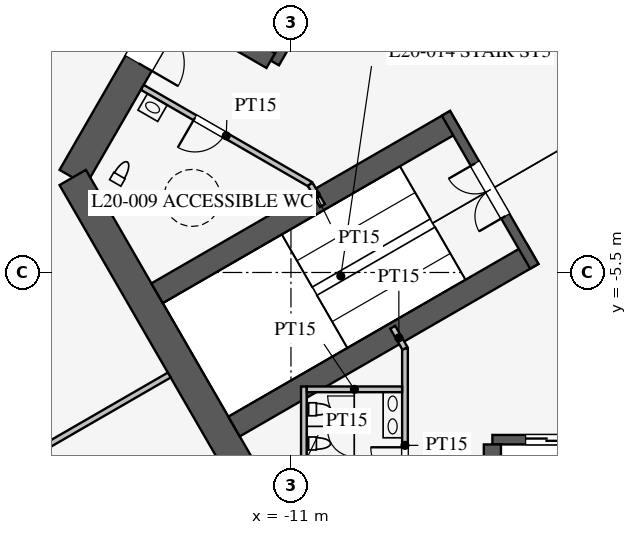
"""IFC4 building model, lengths in metres.
Left out: names, types, materials, properties, quantities, classifications, styles, units other than length and angle.
Written with IfcOpenShell. Run it as: python <this file> out.ifc"""

import sys

from ifc_helpers import new_model, si_unit, direction, frame, frame_2d, origin, place, context, subcontext, project, spatial, rectangle, extrude, element, fill, save


model = new_model("IFC4")
c1 = context("Model", 3, precision=1e-05, world=origin(), true_north=direction((0.0, 1.0)))
c2 = subcontext(c1, "Body", "Model", "MODEL_VIEW")
j1 = project(units=[si_unit("LENGTHUNIT", "METRE"), si_unit("PLANEANGLEUNIT", "RADIAN")], contexts=[c1])
p1 = place(None, origin())
s1 = spatial("IfcSite", under=j1, at=p1, CompositionType="ELEMENT")
p2 = place(p1, origin())
s2 = spatial("IfcBuilding", under=s1, at=p2, CompositionType="ELEMENT")
p3 = place(p2, frame((0.0, 0.0, 87.9)))
s3 = spatial("IfcBuildingStorey", under=s2, at=p3, CompositionType="ELEMENT", Elevation=87.9)
p4 = place(p3, frame((-5.773, 16.0, 0.0), z_axis=(0.0, 0.0, 1.0), x_axis=(-0.500002442456, -0.866023993627, 0.0)))
e1 = element("IfcWall", 1, at=p4, inside=s3, PredefinedType="SHEAR", context=c2, shape_type="SweptSolid", body=[
    extrude(rectangle(XDim=21.939, YDim=0.8, at=frame_2d((10.97, 0.0))), origin(), (0.0, 0.0, 1.0), 4.2),
])
p5 = place(p4, frame((17.27, 0.0, 0.0)))
e2 = element("IfcOpeningElement", 2, at=p5, cuts=e1, PredefinedType="OPENING", context=c2, shape_type="SweptSolid", body=[
    extrude(rectangle(XDim=1.2, YDim=2.1, at=frame_2d((0.6, 1.05))), frame((0.0, 0.41, 0.0), z_axis=(0.0, -1.0, 0.0), x_axis=(1.0, 0.0, 0.0)), (0.0, 0.0, 1.0), 0.82),
])
p6 = place(p4, frame((3.47, 0.0, 0.0)))
e3 = element("IfcOpeningElement", 3, at=p6, cuts=e1, PredefinedType="OPENING", context=c2, shape_type="SweptSolid", body=[
    extrude(rectangle(XDim=1.2, YDim=2.1, at=frame_2d((0.6, 1.05))), frame((0.0, 0.41, 0.0), z_axis=(0.0, -1.0, 0.0), x_axis=(1.0, 0.0, 0.0)), (0.0, 0.0, 1.0), 0.82),
])
p7 = place(p3, frame((-16.743, -3.0, 0.0), z_axis=(0.0, 0.0, 1.0), x_axis=(0.499995765644, -0.866027848477, 0.0)))
e4 = element("IfcWall", 4, at=p7, inside=s3, PredefinedType="SHEAR", context=c2, shape_type="SweptSolid", body=[
    extrude(rectangle(XDim=11.547, YDim=0.8, at=frame_2d((5.773, 0.0))), origin(), (0.0, 0.0, 1.0), 4.2),
])
p8 = place(p3, frame((-5.7, -9.9, 0.0), z_axis=(0.0, 0.0, 1.0), x_axis=(1.0, 0.0, 0.0)))
e5 = element("IfcWall", 5, at=p8, inside=s3, PredefinedType="SHEAR", context=c2, shape_type="SweptSolid", body=[
    extrude(rectangle(XDim=11.4, YDim=0.25, at=frame_2d((5.7, 0.0))), origin(), (0.0, 0.0, 1.0), 4.2),
])
p9 = place(p8, frame((0.875, 0.0, 0.0)))
e6 = element("IfcOpeningElement", 6, at=p9, cuts=e5, PredefinedType="OPENING", context=c2, shape_type="SweptSolid", body=[
    extrude(rectangle(XDim=1.1, YDim=2.2, at=frame_2d((0.55, 1.1))), frame((0.0, 0.135, 0.0), z_axis=(0.0, -1.0, 0.0), x_axis=(1.0, 0.0, 0.0)), (0.0, 0.0, 1.0), 0.27),
])
p10 = place(p8, frame((3.725, 0.0, 0.0)))
e7 = element("IfcOpeningElement", 7, at=p10, cuts=e5, PredefinedType="OPENING", context=c2, shape_type="SweptSolid", body=[
    extrude(rectangle(XDim=1.1, YDim=2.2, at=frame_2d((0.55, 1.1))), frame((0.0, 0.135, 0.0), z_axis=(0.0, -1.0, 0.0), x_axis=(1.0, 0.0, 0.0)), (0.0, 0.0, 1.0), 0.27),
])
p11 = place(p8, frame((6.575, 0.0, 0.0)))
e8 = element("IfcOpeningElement", 8, at=p11, cuts=e5, PredefinedType="OPENING", context=c2, shape_type="SweptSolid", body=[
    extrude(rectangle(XDim=1.1, YDim=2.2, at=frame_2d((0.55, 1.1))), frame((0.0, 0.135, 0.0), z_axis=(0.0, -1.0, 0.0), x_axis=(1.0, 0.0, 0.0)), (0.0, 0.0, 1.0), 0.27),
])
p12 = place(p8, frame((9.425, 0.0, 0.0)))
e9 = element("IfcOpeningElement", 9, at=p12, cuts=e5, PredefinedType="OPENING", context=c2, shape_type="SweptSolid", body=[
    extrude(rectangle(XDim=1.1, YDim=2.2, at=frame_2d((0.55, 1.1))), frame((0.0, 0.135, 0.0), z_axis=(0.0, -1.0, 0.0), x_axis=(1.0, 0.0, 0.0)), (0.0, 0.0, 1.0), 0.27),
])
p13 = place(p3, frame((-5.7, -10.025, 0.0), z_axis=(0.0, 0.0, 1.0), x_axis=(0.0, -1.0, 0.0)))
e10 = element("IfcWall", 10, at=p13, inside=s3, PredefinedType="SHEAR", context=c2, shape_type="SweptSolid", body=[
    extrude(rectangle(XDim=2.575, YDim=0.45, at=frame_2d((1.288, 0.0))), origin(), (0.0, 0.0, 1.0), 4.2),
])
p14 = place(p3, frame((-5.724, 9.886, 0.0), z_axis=(0.0, 0.0, 1.0), x_axis=(-0.500001763848, -0.866024385424, 0.0)))
e11 = element("IfcWall", 11, at=p14, inside=s3, PredefinedType="SHEAR", context=c2, shape_type="SweptSolid", body=[
    extrude(rectangle(XDim=11.4, YDim=0.25, at=frame_2d((5.7, 0.0))), origin(), (0.0, 0.0, 1.0), 4.2),
])
p15 = place(p14, frame((6.525, 0.0, 0.0)))
e12 = element("IfcOpeningElement", 12, at=p15, cuts=e11, PredefinedType="OPENING", context=c2, shape_type="SweptSolid", body=[
    extrude(rectangle(XDim=1.2, YDim=2.2, at=frame_2d((0.6, 1.1))), frame((0.0, 0.135, 0.0), z_axis=(0.0, -1.0, 0.0), x_axis=(1.0, 0.0, 0.0)), (0.0, 0.0, 1.0), 0.27),
])
p16 = place(p14, frame((9.375, 0.0, 0.0)))
e13 = element("IfcOpeningElement", 13, at=p16, cuts=e11, PredefinedType="OPENING", context=c2, shape_type="SweptSolid", body=[
    extrude(rectangle(XDim=1.2, YDim=2.2, at=frame_2d((0.6, 1.1))), frame((0.0, 0.135, 0.0), z_axis=(0.0, -1.0, 0.0), x_axis=(1.0, 0.0, 0.0)), (0.0, 0.0, 1.0), 0.27),
])
p17 = place(p3, frame((-11.532, 0.076, 0.0), z_axis=(0.0, 0.0, 1.0), x_axis=(-0.866005588531, 0.500034319456, 0.0)))
e14 = element("IfcWall", 14, at=p17, inside=s3, PredefinedType="SHEAR", context=c2, shape_type="SweptSolid", body=[
    extrude(rectangle(XDim=2.575, YDim=0.45, at=frame_2d((1.288, 0.0))), origin(), (0.0, 0.0, 1.0), 4.2),
])
for number, where, z_axis, x_axis in (
    (15, (-6.663, -1.509, 0.0), (0.0, 0.0, 1.0), (-0.866, -0.5, 0.0)),
    (16, (-4.638, -5.016, 0.0), (0.0, 0.0, 1.0), (-0.866, -0.5, 0.0)),
):
    element("IfcWall", number, at=place(p3, frame(where, z_axis=z_axis, x_axis=x_axis)), inside=s3, PredefinedType="SHEAR", context=c2, shape_type="SweptSolid", body=[
        extrude(rectangle(XDim=9.075, YDim=0.6, at=frame_2d((4.538, 0.0))), origin(), (0.0, 0.0, 1.0), 4.2),
    ])
p18 = place(p3, frame((-6.922, -1.312, 0.0), z_axis=(0.0, 0.0, 1.0), x_axis=(0.499984536904, -0.866034331223, 0.0)))
e17 = element("IfcWall", 17, at=p18, inside=s3, PredefinedType="SHEAR", context=c2, shape_type="SweptSolid", body=[
    extrude(rectangle(XDim=4.65, YDim=0.25, at=frame_2d((2.325, 0.0))), origin(), (0.0, 0.0, 1.0), 4.2),
])
p19 = place(p18, frame((1.525, 0.0, 0.0)))
e18 = element("IfcOpeningElement", 18, at=p19, cuts=e17, PredefinedType="OPENING", context=c2, shape_type="SweptSolid", body=[
    extrude(rectangle(XDim=1.6, YDim=2.1, at=frame_2d((0.8, 1.05))), frame((0.0, 0.135, 0.0), z_axis=(0.0, -1.0, 0.0), x_axis=(1.0, 0.0, 0.0)), (0.0, 0.0, 1.0), 0.27),
])
p20 = place(p3, frame((-8.0, -7.5, 0.0), z_axis=(0.0, 0.0, 1.0), x_axis=(0.0, -1.0, 0.0)))
e19 = element("IfcWall", 19, at=p20, inside=s3, PredefinedType="PARTITIONING", context=c2, shape_type="SweptSolid", body=[
    extrude(rectangle(XDim=5.1, YDim=0.15, at=frame_2d((2.55, 0.0))), origin(), (0.0, 0.0, 1.0), 3.95),
])
p21 = place(p20, frame((2.6, 0.0, 0.0)))
e20 = element("IfcOpeningElement", 20, at=p21, cuts=e19, PredefinedType="OPENING", context=c2, shape_type="SweptSolid", body=[
    extrude(rectangle(XDim=0.9, YDim=2.1, at=frame_2d((0.45, 1.05))), frame((0.0, 0.085, 0.0), z_axis=(0.0, -1.0, 0.0), x_axis=(1.0, 0.0, 0.0)), (0.0, 0.0, 1.0), 0.17),
])
p22 = place(p3, frame((-10.495, -3.178, 0.0), z_axis=(0.0, 0.0, 1.0), x_axis=(-0.86602216432, 0.500005610874, 0.0)))
e21 = element("IfcWall", 21, at=p22, inside=s3, PredefinedType="PARTITIONING", context=c2, shape_type="SweptSolid", body=[
    extrude(rectangle(XDim=5.1, YDim=0.15, at=frame_2d((2.55, 0.0))), origin(), (0.0, 0.0, 1.0), 3.95),
])
p23 = place(p22, frame((2.6, 0.0, 0.0)))
e22 = element("IfcOpeningElement", 22, at=p23, cuts=e21, PredefinedType="OPENING", context=c2, shape_type="SweptSolid", body=[
    extrude(rectangle(XDim=0.9, YDim=2.1, at=frame_2d((0.45, 1.05))), frame((0.0, 0.085, 0.0), z_axis=(0.0, -1.0, 0.0), x_axis=(1.0, 0.0, 0.0)), (0.0, 0.0, 1.0), 0.17),
])
for number, where, z_axis, x_axis in (
    (23, (-10.495, -3.178, 0.0), (0.0, 0.0, 1.0), (0.5, -0.866, 0.0)),
    (24, (-8.0, -7.5, 0.0), (0.0, 0.0, 1.0), (-0.5, 0.866, 0.0)),
):
    element("IfcWall", number, at=place(p3, frame(where, z_axis=z_axis, x_axis=x_axis)), inside=s3, PredefinedType="PARTITIONING", context=c2, shape_type="SweptSolid", body=[
        extrude(rectangle(XDim=0.645, YDim=0.15, at=frame_2d((0.323, 0.0))), origin(), (0.0, 0.0, 1.0), 3.95),
    ])
p24 = place(p3, frame((-10.66, -8.5, 0.0), z_axis=(0.0, 0.0, 1.0), x_axis=(0.0, -1.0, 0.0)))
e25 = element("IfcWall", 25, at=p24, inside=s3, PredefinedType="PARTITIONING", context=c2, shape_type="SweptSolid", body=[
    extrude(rectangle(XDim=4.1, YDim=0.15, at=frame_2d((2.05, 0.0))), origin(), (0.0, 0.0, 1.0), 3.95),
])
p25 = place(p3, frame((-8.075, -8.575, 0.0), z_axis=(0.0, 0.0, 1.0), x_axis=(-1.0, 0.0, 0.0)))
e26 = element("IfcWall", 26, at=p25, inside=s3, PredefinedType="PARTITIONING", context=c2, shape_type="SweptSolid", body=[
    extrude(rectangle(XDim=2.51, YDim=0.15, at=frame_2d((1.255, 0.0))), origin(), (0.0, 0.0, 1.0), 3.95),
])
p26 = place(p3, frame((-14.203, -8.2, 0.0), z_axis=(0.0, 0.0, 1.0), x_axis=(-0.866024965723, -0.500000758745, 0.0)))
e27 = element("IfcWall", 27, at=p26, inside=s3, PredefinedType="PARTITIONING", context=c2, shape_type="SweptSolid", body=[
    extrude(rectangle(XDim=18.25, YDim=0.15, at=frame_2d((9.125, 0.0))), origin(), (0.0, 0.0, 1.0), 1.95),
])
p27 = place(p21, frame((0.9, 0.0, 0.0), z_axis=(0.0, 0.0, 1.0), x_axis=(-1.0, 0.0, 0.0)))
e28 = element("IfcDoor", 28, at=p27, inside=s3, OperationType="SINGLE_SWING_RIGHT", PredefinedType="DOOR", context=c2, shape_type="SweptSolid", body=[
    extrude(rectangle(XDim=0.9, YDim=2.1, at=frame_2d((0.45, 1.05))), frame((0.0, 0.025, 0.0), z_axis=(0.0, -1.0, 0.0), x_axis=(1.0, 0.0, 0.0)), (0.0, 0.0, 1.0), 0.05),
])
fill(e20, e28)
p28 = place(p23, origin())
e29 = element("IfcDoor", 29, at=p28, inside=s3, OperationType="SINGLE_SWING_RIGHT", PredefinedType="DOOR", context=c2, shape_type="SweptSolid", body=[
    extrude(rectangle(XDim=0.9, YDim=2.1, at=frame_2d((0.45, 1.05))), frame((0.0, 0.025, 0.0), z_axis=(0.0, -1.0, 0.0), x_axis=(1.0, 0.0, 0.0)), (0.0, 0.0, 1.0), 0.05),
])
fill(e22, e29)
p29 = place(p19, frame((1.6, 0.0, 0.0), z_axis=(0.0, 0.0, 1.0), x_axis=(-1.0, 0.0, 0.0)))
e30 = element("IfcDoor", 30, at=p29, inside=s3, OperationType="DOUBLE_DOOR_SINGLE_SWING", PredefinedType="DOOR", context=c2, shape_type="SweptSolid", body=[
    extrude(rectangle(XDim=1.6, YDim=2.1, at=frame_2d((0.8, 1.05))), frame((0.0, 0.025, 0.0), z_axis=(0.0, -1.0, 0.0), x_axis=(1.0, 0.0, 0.0)), (0.0, 0.0, 1.0), 0.05),
])
fill(e18, e30)
p30 = place(p5, origin())
e31 = element("IfcDoor", 31, at=p30, inside=s3, OperationType="SINGLE_SWING_RIGHT", PredefinedType="DOOR", context=c2, shape_type="SweptSolid", body=[
    extrude(rectangle(XDim=1.2, YDim=2.1, at=frame_2d((0.6, 1.05))), frame((0.0, 0.025, 0.0), z_axis=(0.0, -1.0, 0.0), x_axis=(1.0, 0.0, 0.0)), (0.0, 0.0, 1.0), 0.05),
])
fill(e2, e31)
p31 = place(p9, origin())
e32 = element("IfcDoor", 32, at=p31, inside=s3, OperationType="DOUBLE_DOOR_SLIDING", PredefinedType="DOOR", context=c2, shape_type="SweptSolid", body=[
    extrude(rectangle(XDim=1.1, YDim=2.2, at=frame_2d((0.55, 1.1))), frame((0.0, 0.025, 0.0), z_axis=(0.0, -1.0, 0.0), x_axis=(1.0, 0.0, 0.0)), (0.0, 0.0, 1.0), 0.05),
])
fill(e6, e32)
save(model, sys.argv[1])
